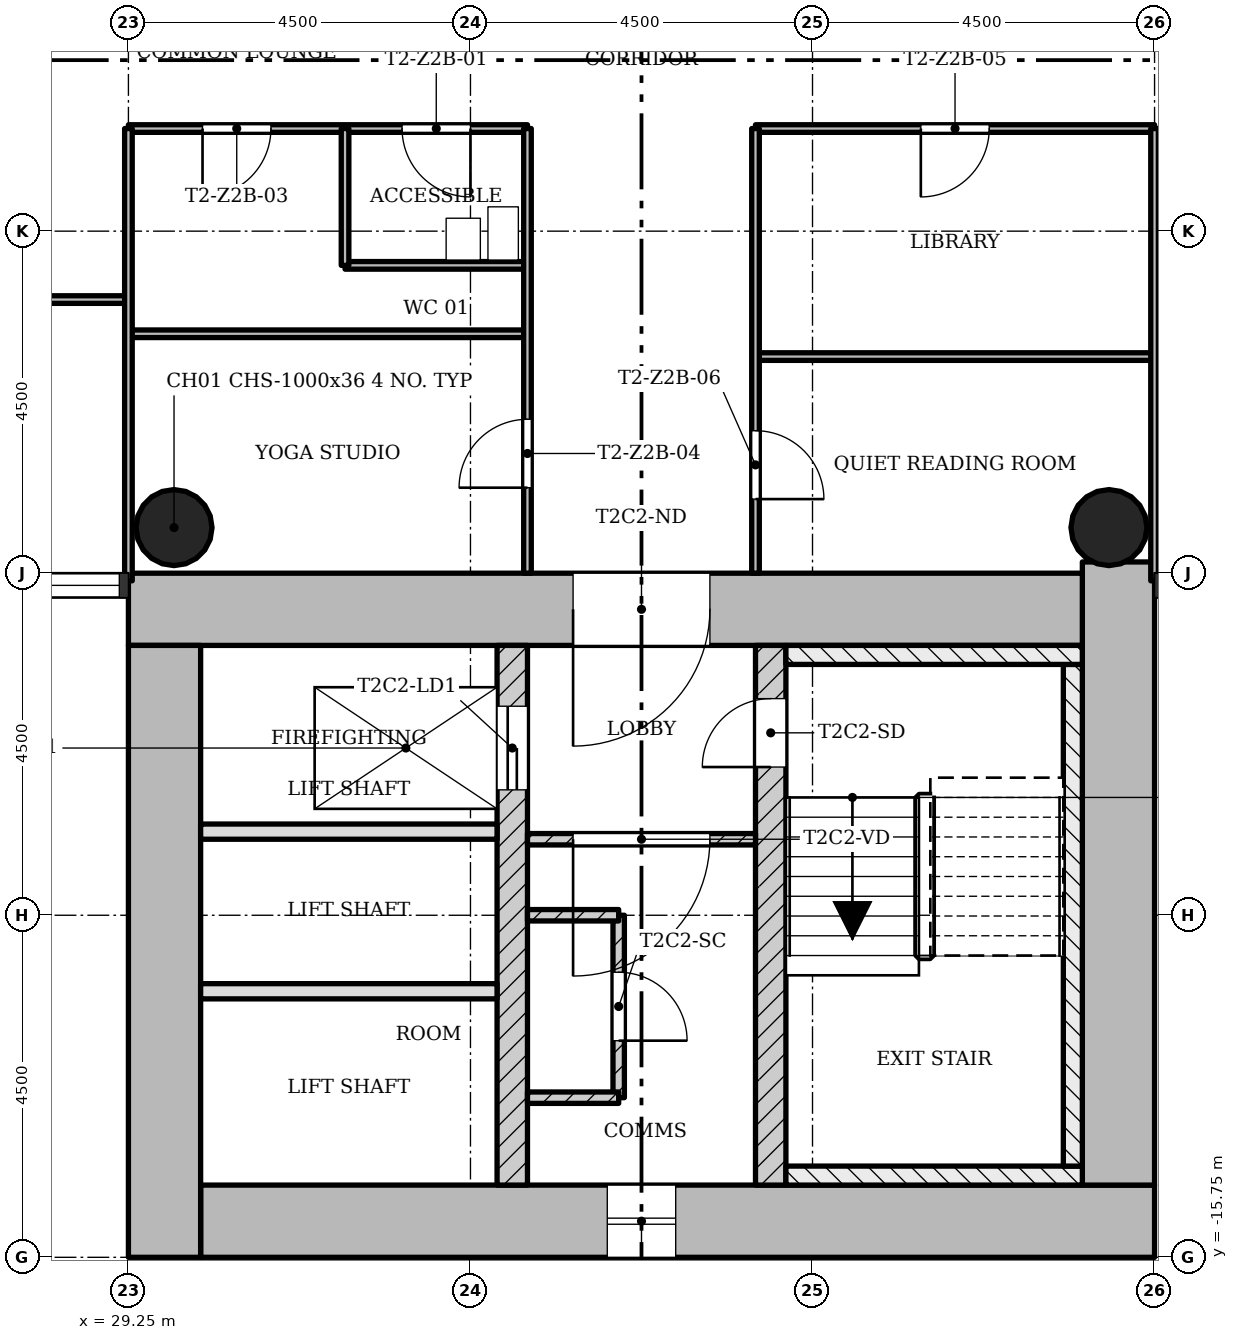
"""IFC4 building model, lengths in metres.
Left out: names, types, materials, properties, quantities, classifications, styles, units other than length and angle.
Written with IfcOpenShell. Run it as: python <this file> out.ifc"""

import sys

from ifc_helpers import new_model, si_unit, direction, frame, frame_2d, origin, origin_2d, place, context, subcontext, project, spatial, rectangle, hollow_circle, extrude, element, fill, save


model = new_model("IFC4")
c1 = context("Model", 3, precision=1e-05, world=origin(), true_north=direction((0.0, 1.0)))
c2 = subcontext(c1, "Body", "Model", "MODEL_VIEW")
j1 = project(units=[si_unit("LENGTHUNIT", "METRE"), si_unit("PLANEANGLEUNIT", "RADIAN")], contexts=[c1])
p1 = place(None, origin())
s1 = spatial("IfcSite", under=j1, at=p1, CompositionType="ELEMENT")
p2 = place(p1, origin())
s2 = spatial("IfcBuilding", under=s1, at=p2, CompositionType="ELEMENT")
p3 = place(p2, frame((0.0, 0.0, 80.0)))
s3 = spatial("IfcBuildingStorey", under=s2, at=p3, CompositionType="ELEMENT", Elevation=80.0)
p4 = place(p3, frame((30.2, -15.275, 0.0), z_axis=(0.0, 0.0, 1.0), x_axis=(1.0, 0.0, 0.0)))
e1 = element("IfcWall", 1, at=p4, inside=s3, PredefinedType="SHEAR", context=c2, shape_type="SweptSolid", body=[
    extrude(rectangle(XDim=12.55, YDim=0.95, at=frame_2d((6.275, 0.0))), origin(), (0.0, 0.0, 1.0), 3.4),
])
p5 = place(p4, frame((5.35, 0.0, 0.45)))
e2 = element("IfcOpeningElement", 2, at=p5, cuts=e1, PredefinedType="OPENING", context=c2, shape_type="SweptSolid", body=[
    extrude(rectangle(XDim=0.9, YDim=2.4, at=frame_2d((0.45, 1.2))), frame((0.0, 0.485, 0.0), z_axis=(0.0, -1.0, 0.0), x_axis=(1.0, 0.0, 0.0)), (0.0, 0.0, 1.0), 0.97),
])
p6 = place(p3, frame((42.275, -14.8, 0.0), z_axis=(0.0, 0.0, 1.0), x_axis=(0.0, 1.0, 0.0)))
e3 = element("IfcWall", 3, at=p6, inside=s3, PredefinedType="SHEAR", context=c2, shape_type="SweptSolid", body=[
    extrude(rectangle(XDim=8.198, YDim=0.95, at=frame_2d((4.099, 0.0))), origin(), (0.0, 0.0, 1.0), 3.4),
])
p7 = place(p3, frame((41.8, -7.225, 0.0), z_axis=(0.0, 0.0, 1.0), x_axis=(-1.0, 0.0, 0.0)))
e4 = element("IfcWall", 4, at=p7, inside=s3, PredefinedType="SHEAR", context=c2, shape_type="SweptSolid", body=[
    extrude(rectangle(XDim=12.55, YDim=0.95, at=frame_2d((6.275, 0.0))), origin(), (0.0, 0.0, 1.0), 3.4),
])
p8 = place(p7, frame((4.9, 0.0, 0.0)))
e5 = element("IfcOpeningElement", 5, at=p8, cuts=e4, PredefinedType="OPENING", context=c2, shape_type="SweptSolid", body=[
    extrude(rectangle(XDim=1.8, YDim=2.1, at=frame_2d((0.9, 1.05))), frame((0.0, 0.485, 0.0), z_axis=(0.0, -1.0, 0.0), x_axis=(1.0, 0.0, 0.0)), (0.0, 0.0, 1.0), 0.97),
])
p9 = place(p3, frame((29.725, -7.7, 0.0), z_axis=(0.0, 0.0, 1.0), x_axis=(0.0, -1.0, 0.0)))
e6 = element("IfcWall", 6, at=p9, inside=s3, PredefinedType="SHEAR", context=c2, shape_type="SweptSolid", body=[
    extrude(rectangle(XDim=8.05, YDim=0.95, at=frame_2d((4.025, 0.0))), origin(), (0.0, 0.0, 1.0), 3.4),
])
p10 = place(p3, frame((34.3, -14.8, 0.0), z_axis=(0.0, 0.0, 1.0), x_axis=(0.0, 1.0, 0.0)))
e7 = element("IfcWall", 7, at=p10, inside=s3, PredefinedType="SHEAR", context=c2, shape_type="SweptSolid", body=[
    extrude(rectangle(XDim=7.1, YDim=0.4, at=frame_2d((3.55, 0.0))), origin(), (0.0, 0.0, 1.0), 3.4),
])
p11 = place(p10, frame((5.2, 0.0, 0.0)))
e8 = element("IfcOpeningElement", 8, at=p11, cuts=e7, PredefinedType="OPENING", context=c2, shape_type="SweptSolid", body=[
    extrude(rectangle(XDim=1.1, YDim=2.1, at=frame_2d((0.55, 1.05))), frame((0.0, 0.21, 0.0), z_axis=(0.0, -1.0, 0.0), x_axis=(1.0, 0.0, 0.0)), (0.0, 0.0, 1.0), 0.42),
])
p12 = place(p3, frame((37.7, -14.8, 0.0), z_axis=(0.0, 0.0, 1.0), x_axis=(0.0, 1.0, 0.0)))
e9 = element("IfcWall", 9, at=p12, inside=s3, PredefinedType="SHEAR", context=c2, shape_type="SweptSolid", body=[
    extrude(rectangle(XDim=7.1, YDim=0.4, at=frame_2d((3.55, 0.0))), origin(), (0.0, 0.0, 1.0), 3.4),
])
p13 = place(p12, frame((5.5, 0.0, 0.0)))
e10 = element("IfcOpeningElement", 10, at=p13, cuts=e9, PredefinedType="OPENING", context=c2, shape_type="SweptSolid", body=[
    extrude(rectangle(XDim=0.9, YDim=2.1, at=frame_2d((0.45, 1.05))), frame((0.0, 0.21, 0.0), z_axis=(0.0, -1.0, 0.0), x_axis=(1.0, 0.0, 0.0)), (0.0, 0.0, 1.0), 0.42),
])
for number, where, z_axis, x_axis in (
    (11, (42.15, -6.15, 0.0), (0.0, 0.0, 1.0), (1.0, 0.0, 0.0)),
    (12, (29.85, -6.15, 0.0), (0.0, 0.0, 1.0), (1.0, 0.0, 0.0)),
):
    element("IfcColumn", number, at=place(p3, frame(where, z_axis=z_axis, x_axis=x_axis)), inside=s3, PredefinedType="COLUMN", context=c2, shape_type="SweptSolid", body=[
        extrude(hollow_circle(Radius=0.5, WallThickness=0.036, at=origin_2d()), origin(), (0.0, 0.0, 1.0), 3.4),
    ])
p14 = place(p3, frame((34.5, -10.25, 0.0), z_axis=(0.0, 0.0, 1.0), x_axis=(1.0, 0.0, 0.0)))
e13 = element("IfcWall", 13, at=p14, inside=s3, PredefinedType="PARTITIONING", context=c2, shape_type="SweptSolid", body=[
    extrude(rectangle(XDim=3.0, YDim=0.15, at=frame_2d((1.5, 0.0))), origin(), (0.0, 0.0, 1.0), 3.0),
])
p15 = place(p14, frame((0.6, 0.0, 0.0)))
e14 = element("IfcOpeningElement", 14, at=p15, cuts=e13, PredefinedType="OPENING", context=c2, shape_type="SweptSolid", body=[
    extrude(rectangle(XDim=1.8, YDim=2.1, at=frame_2d((0.9, 1.05))), frame((0.0, 0.085, 0.0), z_axis=(0.0, -1.0, 0.0), x_axis=(1.0, 0.0, 0.0)), (0.0, 0.0, 1.0), 0.17),
])
for number, where, z_axis, x_axis in (
    (15, (30.2, -10.15, 0.0), (0.0, 0.0, 1.0), (1.0, 0.0, 0.0)),
    (16, (30.2, -12.25, 0.0), (0.0, 0.0, 1.0), (1.0, 0.0, 0.0)),
):
    element("IfcWall", number, at=place(p3, frame(where, z_axis=z_axis, x_axis=x_axis)), inside=s3, PredefinedType="SOLIDWALL", context=c2, shape_type="SweptSolid", body=[
        extrude(rectangle(XDim=3.9, YDim=0.2, at=frame_2d((1.95, 0.0))), origin(), (0.0, 0.0, 1.0), 3.0),
    ])
p16 = place(p3, frame((35.7, -11.25, 0.0), z_axis=(0.0, 0.0, 1.0), x_axis=(0.0, -1.0, 0.0)))
e17 = element("IfcWall", 17, at=p16, inside=s3, PredefinedType="PARTITIONING", context=c2, shape_type="SweptSolid", body=[
    extrude(rectangle(XDim=2.4, YDim=0.15, at=frame_2d((1.2, 0.0))), origin(), (0.0, 0.0, 1.0), 3.0),
])
p17 = place(p16, frame((0.75, 0.0, 0.0)))
e18 = element("IfcOpeningElement", 18, at=p17, cuts=e17, PredefinedType="OPENING", context=c2, shape_type="SweptSolid", body=[
    extrude(rectangle(XDim=0.9, YDim=2.1, at=frame_2d((0.45, 1.05))), frame((0.0, 0.085, 0.0), z_axis=(0.0, -1.0, 0.0), x_axis=(1.0, 0.0, 0.0)), (0.0, 0.0, 1.0), 0.17),
])
for number, where, z_axis, x_axis in (
    (19, (35.7, -11.25, 0.0), (0.0, 0.0, 1.0), (-1.0, 0.0, 0.0)),
    (20, (35.7, -13.65, 0.0), (0.0, 0.0, 1.0), (-1.0, 0.0, 0.0)),
):
    element("IfcWall", number, at=place(p3, frame(where, z_axis=z_axis, x_axis=x_axis)), inside=s3, PredefinedType="PARTITIONING", context=c2, shape_type="SweptSolid", body=[
        extrude(rectangle(XDim=1.2, YDim=0.15, at=frame_2d((0.6, 0.0))), origin(), (0.0, 0.0, 1.0), 3.0),
    ])
for number, where, z_axis, x_axis in (
    (21, (42.75, -3.9, 0.0), (0.0, 0.0, 1.0), (-1.0, 0.0, 0.0)),
    (22, (34.5, -3.6, 0.0), (0.0, 0.0, 1.0), (-1.0, 0.0, 0.0)),
):
    element("IfcWall", number, at=place(p3, frame(where, z_axis=z_axis, x_axis=x_axis)), inside=s3, PredefinedType="PARTITIONING", context=c2, shape_type="SweptSolid", body=[
        extrude(rectangle(XDim=5.25, YDim=0.1, at=frame_2d((2.625, 0.0))), origin(), (0.0, 0.0, 1.0), 3.0),
    ])
p18 = place(p3, frame((51.75, -3.15, 0.0), z_axis=(0.0, 0.0, 1.0), x_axis=(-1.0, 0.0, 0.0)))
e23 = element("IfcWall", 23, at=p18, inside=s3, PredefinedType="PARTITIONING", context=c2, shape_type="SweptSolid", body=[
    extrude(rectangle(XDim=9.0, YDim=0.1, at=frame_2d((4.5, 0.0))), origin(), (0.0, 0.0, 1.0), 3.0),
])
p19 = place(p18, frame((5.55, 0.0, 0.0)))
e24 = element("IfcOpeningElement", 24, at=p19, cuts=e23, PredefinedType="OPENING", context=c2, shape_type="SweptSolid", body=[
    extrude(rectangle(XDim=0.9, YDim=2.1, at=frame_2d((0.45, 1.05))), frame((0.0, 0.06, 0.0), z_axis=(0.0, -1.0, 0.0), x_axis=(1.0, 0.0, 0.0)), (0.0, 0.0, 1.0), 0.12),
])
p20 = place(p3, frame((29.25, -3.15, 0.0), z_axis=(0.0, 0.0, 1.0), x_axis=(-1.0, 0.0, 0.0)))
e25 = element("IfcWall", 25, at=p20, inside=s3, PredefinedType="PARTITIONING", context=c2, shape_type="SweptSolid", body=[
    extrude(rectangle(XDim=9.0, YDim=0.1, at=frame_2d((4.5, 0.0))), origin(), (0.0, 0.0, 1.0), 3.0),
])
p21 = place(p20, frame((2.55, 0.0, 0.0)))
e26 = element("IfcOpeningElement", 26, at=p21, cuts=e25, PredefinedType="OPENING", context=c2, shape_type="SweptSolid", body=[
    extrude(rectangle(XDim=0.9, YDim=2.1, at=frame_2d((0.45, 1.05))), frame((0.0, 0.06, 0.0), z_axis=(0.0, -1.0, 0.0), x_axis=(1.0, 0.0, 0.0)), (0.0, 0.0, 1.0), 0.12),
])
p22 = place(p3, frame((34.5, -2.7, 0.0), z_axis=(0.0, 0.0, 1.0), x_axis=(-1.0, 0.0, 0.0)))
e27 = element("IfcWall", 27, at=p22, inside=s3, PredefinedType="PARTITIONING", context=c2, shape_type="SweptSolid", body=[
    extrude(rectangle(XDim=2.4, YDim=0.1, at=frame_2d((1.2, 0.0))), origin(), (0.0, 0.0, 1.0), 3.0),
])
p23 = place(p3, frame((42.75, -0.9, 0.0), z_axis=(0.0, 0.0, 1.0), x_axis=(-1.0, 0.0, 0.0)))
e28 = element("IfcWall", 28, at=p23, inside=s3, PredefinedType="PARTITIONING", context=c2, shape_type="SweptSolid", body=[
    extrude(rectangle(XDim=5.25, YDim=0.1, at=frame_2d((2.625, 0.0))), origin(), (0.0, 0.0, 1.0), 3.0),
])
p24 = place(p23, frame((2.175, 0.0, 0.0)))
e29 = element("IfcOpeningElement", 29, at=p24, cuts=e28, PredefinedType="OPENING", context=c2, shape_type="SweptSolid", body=[
    extrude(rectangle(XDim=0.9, YDim=2.1, at=frame_2d((0.45, 1.05))), frame((0.0, 0.06, 0.0), z_axis=(0.0, -1.0, 0.0), x_axis=(1.0, 0.0, 0.0)), (0.0, 0.0, 1.0), 0.12),
])
p25 = place(p3, frame((34.5, -0.9, 0.0), z_axis=(0.0, 0.0, 1.0), x_axis=(-1.0, 0.0, 0.0)))
e30 = element("IfcWall", 30, at=p25, inside=s3, PredefinedType="PARTITIONING", context=c2, shape_type="SweptSolid", body=[
    extrude(rectangle(XDim=5.25, YDim=0.1, at=frame_2d((2.625, 0.0))), origin(), (0.0, 0.0, 1.0), 3.0),
])
p26 = place(p25, frame((0.75, 0.0, 0.0)))
e31 = element("IfcOpeningElement", 31, at=p26, cuts=e30, PredefinedType="OPENING", context=c2, shape_type="SweptSolid", body=[
    extrude(rectangle(XDim=0.9, YDim=2.1, at=frame_2d((0.45, 1.05))), frame((0.0, 0.06, 0.0), z_axis=(0.0, -1.0, 0.0), x_axis=(1.0, 0.0, 0.0)), (0.0, 0.0, 1.0), 0.12),
])
p27 = place(p25, frame((3.375, 0.0, 0.0)))
e32 = element("IfcOpeningElement", 32, at=p27, cuts=e30, PredefinedType="OPENING", context=c2, shape_type="SweptSolid", body=[
    extrude(rectangle(XDim=0.9, YDim=2.1, at=frame_2d((0.45, 1.05))), frame((0.0, 0.06, 0.0), z_axis=(0.0, -1.0, 0.0), x_axis=(1.0, 0.0, 0.0)), (0.0, 0.0, 1.0), 0.12),
])
p28 = place(p3, frame((42.75, -6.85, 0.0), z_axis=(0.0, 0.0, 1.0), x_axis=(0.0, 1.0, 0.0)))
e33 = element("IfcWall", 33, at=p28, inside=s3, PredefinedType="PARTITIONING", context=c2, shape_type="SweptSolid", body=[
    extrude(rectangle(XDim=5.95, YDim=0.1, at=frame_2d((2.975, 0.0))), origin(), (0.0, 0.0, 1.0), 3.0),
])
p29 = place(p3, frame((37.5, -6.75, 0.0), z_axis=(0.0, 0.0, 1.0), x_axis=(0.0, 1.0, 0.0)))
e34 = element("IfcWall", 34, at=p29, inside=s3, PredefinedType="PARTITIONING", context=c2, shape_type="SweptSolid", body=[
    extrude(rectangle(XDim=5.85, YDim=0.1, at=frame_2d((2.925, 0.0))), origin(), (0.0, 0.0, 1.0), 3.0),
])
p30 = place(p29, frame((0.975, 0.0, 0.0)))
e35 = element("IfcOpeningElement", 35, at=p30, cuts=e34, PredefinedType="OPENING", context=c2, shape_type="SweptSolid", body=[
    extrude(rectangle(XDim=0.9, YDim=2.1, at=frame_2d((0.45, 1.05))), frame((0.0, 0.06, 0.0), z_axis=(0.0, -1.0, 0.0), x_axis=(1.0, 0.0, 0.0)), (0.0, 0.0, 1.0), 0.12),
])
p31 = place(p3, frame((34.5, -6.75, 0.0), z_axis=(0.0, 0.0, 1.0), x_axis=(0.0, 1.0, 0.0)))
e36 = element("IfcWall", 36, at=p31, inside=s3, PredefinedType="PARTITIONING", context=c2, shape_type="SweptSolid", body=[
    extrude(rectangle(XDim=5.85, YDim=0.1, at=frame_2d((2.925, 0.0))), origin(), (0.0, 0.0, 1.0), 3.0),
])
p32 = place(p31, frame((1.125, 0.0, 0.0)))
e37 = element("IfcOpeningElement", 37, at=p32, cuts=e36, PredefinedType="OPENING", context=c2, shape_type="SweptSolid", body=[
    extrude(rectangle(XDim=0.9, YDim=2.1, at=frame_2d((0.45, 1.05))), frame((0.0, 0.06, 0.0), z_axis=(0.0, -1.0, 0.0), x_axis=(1.0, 0.0, 0.0)), (0.0, 0.0, 1.0), 0.12),
])
p33 = place(p3, frame((32.1, -2.7, 0.0), z_axis=(0.0, 0.0, 1.0), x_axis=(0.0, 1.0, 0.0)))
e38 = element("IfcWall", 38, at=p33, inside=s3, PredefinedType="PARTITIONING", context=c2, shape_type="SweptSolid", body=[
    extrude(rectangle(XDim=1.8, YDim=0.1, at=frame_2d((0.9, 0.0))), origin(), (0.0, 0.0, 1.0), 3.0),
])
p34 = place(p3, frame((29.25, -6.85, 0.0), z_axis=(0.0, 0.0, 1.0), x_axis=(0.0, 1.0, 0.0)))
e39 = element("IfcWall", 39, at=p34, inside=s3, PredefinedType="PARTITIONING", context=c2, shape_type="SweptSolid", body=[
    extrude(rectangle(XDim=5.95, YDim=0.1, at=frame_2d((2.975, 0.0))), origin(), (0.0, 0.0, 1.0), 3.0),
])
p35 = place(p3, frame((37.9, -14.675, 0.0), z_axis=(0.0, 0.0, 1.0), x_axis=(1.0, 0.0, 0.0)))
e40 = element("IfcWall", 40, at=p35, inside=s3, PredefinedType="SHEAR", context=c2, shape_type="SweptSolid", body=[
    extrude(rectangle(XDim=3.9, YDim=0.25, at=frame_2d((1.95, 0.0))), origin(), (0.0, 0.0, 1.0), 3.4),
])
p36 = place(p3, frame((41.675, -7.95, 0.0), z_axis=(0.0, 0.0, 1.0), x_axis=(0.0, -1.0, 0.0)))
e41 = element("IfcWall", 41, at=p36, inside=s3, PredefinedType="SHEAR", context=c2, shape_type="SweptSolid", body=[
    extrude(rectangle(XDim=6.6, YDim=0.25, at=frame_2d((3.3, 0.0))), origin(), (0.0, 0.0, 1.0), 3.4),
])
p37 = place(p3, frame((37.9, -7.825, 0.0), z_axis=(0.0, 0.0, 1.0), x_axis=(1.0, 0.0, 0.0)))
e42 = element("IfcWall", 42, at=p37, inside=s3, PredefinedType="SHEAR", context=c2, shape_type="SweptSolid", body=[
    extrude(rectangle(XDim=3.9, YDim=0.25, at=frame_2d((1.95, 0.0))), origin(), (0.0, 0.0, 1.0), 3.4),
])
p38 = place(p5, origin())
e43 = element("IfcWindow", 43, at=p38, inside=s3, PartitioningType="SINGLE_PANEL", PredefinedType="WINDOW", context=c2, shape_type="SweptSolid", body=[
    extrude(rectangle(XDim=0.9, YDim=2.4, at=frame_2d((0.45, 1.2))), frame((0.0, 0.03, 0.0), z_axis=(0.0, -1.0, 0.0), x_axis=(1.0, 0.0, 0.0)), (0.0, 0.0, 1.0), 0.06),
])
fill(e2, e43)
p39 = place(p15, origin())
e44 = element("IfcDoor", 44, at=p39, inside=s3, OperationType="SINGLE_SWING_LEFT", PredefinedType="DOOR", context=c2, shape_type="SweptSolid", body=[
    extrude(rectangle(XDim=1.8, YDim=2.1, at=frame_2d((0.9, 1.05))), frame((0.0, 0.025, 0.0), z_axis=(0.0, -1.0, 0.0), x_axis=(1.0, 0.0, 0.0)), (0.0, 0.0, 1.0), 0.05),
])
fill(e14, e44)
p40 = place(p17, origin())
e45 = element("IfcDoor", 45, at=p40, inside=s3, OperationType="SINGLE_SWING_LEFT", PredefinedType="DOOR", context=c2, shape_type="SweptSolid", body=[
    extrude(rectangle(XDim=0.9, YDim=2.1, at=frame_2d((0.45, 1.05))), frame((0.0, 0.025, 0.0), z_axis=(0.0, -1.0, 0.0), x_axis=(1.0, 0.0, 0.0)), (0.0, 0.0, 1.0), 0.05),
])
fill(e18, e45)
p41 = place(p26, origin())
e46 = element("IfcDoor", 46, at=p41, inside=s3, OperationType="SINGLE_SWING_RIGHT", PredefinedType="DOOR", context=c2, shape_type="SweptSolid", body=[
    extrude(rectangle(XDim=0.9, YDim=2.1, at=frame_2d((0.45, 1.05))), frame((0.0, 0.025, 0.0), z_axis=(0.0, -1.0, 0.0), x_axis=(1.0, 0.0, 0.0)), (0.0, 0.0, 1.0), 0.05),
])
fill(e31, e46)
p42 = place(p27, origin())
e47 = element("IfcDoor", 47, at=p42, inside=s3, OperationType="SINGLE_SWING_LEFT", PredefinedType="DOOR", context=c2, shape_type="SweptSolid", body=[
    extrude(rectangle(XDim=0.9, YDim=2.1, at=frame_2d((0.45, 1.05))), frame((0.0, 0.025, 0.0), z_axis=(0.0, -1.0, 0.0), x_axis=(1.0, 0.0, 0.0)), (0.0, 0.0, 1.0), 0.05),
])
fill(e32, e47)
p43 = place(p32, origin())
e48 = element("IfcDoor", 48, at=p43, inside=s3, OperationType="SINGLE_SWING_RIGHT", PredefinedType="DOOR", context=c2, shape_type="SweptSolid", body=[
    extrude(rectangle(XDim=0.9, YDim=2.1, at=frame_2d((0.45, 1.05))), frame((0.0, 0.025, 0.0), z_axis=(0.0, -1.0, 0.0), x_axis=(1.0, 0.0, 0.0)), (0.0, 0.0, 1.0), 0.05),
])
fill(e37, e48)
p44 = place(p24, origin())
e49 = element("IfcDoor", 49, at=p44, inside=s3, OperationType="SINGLE_SWING_LEFT", PredefinedType="DOOR", context=c2, shape_type="SweptSolid", body=[
    extrude(rectangle(XDim=0.9, YDim=2.1, at=frame_2d((0.45, 1.05))), frame((0.0, 0.025, 0.0), z_axis=(0.0, -1.0, 0.0), x_axis=(1.0, 0.0, 0.0)), (0.0, 0.0, 1.0), 0.05),
])
fill(e29, e49)
p45 = place(p30, origin())
e50 = element("IfcDoor", 50, at=p45, inside=s3, OperationType="SINGLE_SWING_LEFT", PredefinedType="DOOR", context=c2, shape_type="SweptSolid", body=[
    extrude(rectangle(XDim=0.9, YDim=2.1, at=frame_2d((0.45, 1.05))), frame((0.0, 0.025, 0.0), z_axis=(0.0, -1.0, 0.0), x_axis=(1.0, 0.0, 0.0)), (0.0, 0.0, 1.0), 0.05),
])
fill(e35, e50)
p46 = place(p13, origin())
e51 = element("IfcDoor", 51, at=p46, inside=s3, OperationType="SINGLE_SWING_RIGHT", PredefinedType="DOOR", context=c2, shape_type="SweptSolid", body=[
    extrude(rectangle(XDim=0.9, YDim=2.1, at=frame_2d((0.45, 1.05))), frame((0.0, 0.025, 0.0), z_axis=(0.0, -1.0, 0.0), x_axis=(1.0, 0.0, 0.0)), (0.0, 0.0, 1.0), 0.05),
])
fill(e10, e51)
p47 = place(p11, origin())
e52 = element("IfcDoor", 52, at=p47, inside=s3, OperationType="SLIDING_TO_LEFT", PredefinedType="DOOR", context=c2, shape_type="SweptSolid", body=[
    extrude(rectangle(XDim=1.1, YDim=2.1, at=frame_2d((0.55, 1.05))), frame((0.0, 0.025, 0.0), z_axis=(0.0, -1.0, 0.0), x_axis=(1.0, 0.0, 0.0)), (0.0, 0.0, 1.0), 0.05),
])
fill(e8, e52)
p48 = place(p8, origin())
e53 = element("IfcDoor", 53, at=p48, inside=s3, OperationType="SINGLE_SWING_LEFT", PredefinedType="DOOR", context=c2, shape_type="SweptSolid", body=[
    extrude(rectangle(XDim=1.8, YDim=2.1, at=frame_2d((0.9, 1.05))), frame((0.0, 0.025, 0.0), z_axis=(0.0, -1.0, 0.0), x_axis=(1.0, 0.0, 0.0)), (0.0, 0.0, 1.0), 0.05),
])
fill(e5, e53)
save(model, sys.argv[1])
